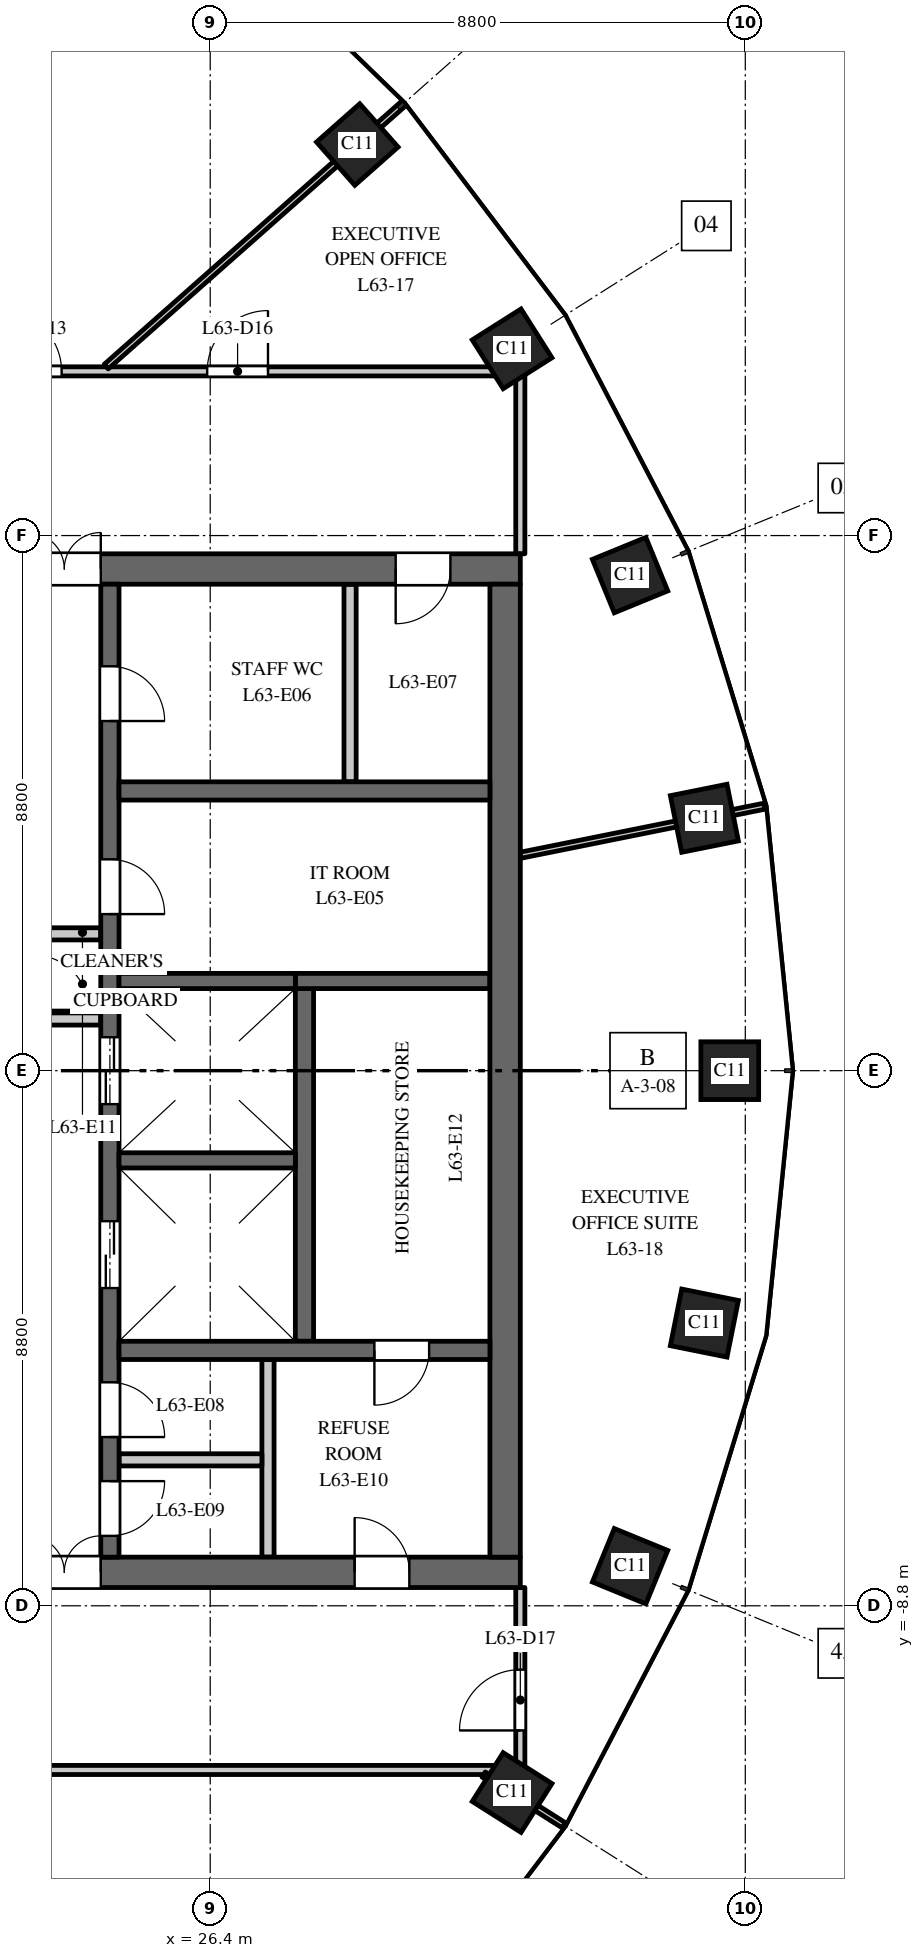
"""IFC4 building model, lengths in metres.
Left out: names, types, materials, properties, quantities, classifications, styles, units other than length and angle.
Written with IfcOpenShell. Run it as: python <this file> out.ifc"""

import sys

from ifc_helpers import new_model, si_unit, direction, frame, frame_2d, origin, origin_2d, place, context, subcontext, project, spatial, rectangle, extrude, element, fill, save


model = new_model("IFC4")
c1 = context("Model", 3, precision=1e-05, world=origin(), true_north=direction((0.0, 1.0)))
c2 = subcontext(c1, "Body", "Model", "MODEL_VIEW")
j1 = project(units=[si_unit("LENGTHUNIT", "METRE"), si_unit("PLANEANGLEUNIT", "RADIAN")], contexts=[c1])
p1 = place(None, origin())
s1 = spatial("IfcSite", under=j1, at=p1, CompositionType="ELEMENT")
p2 = place(p1, origin())
s2 = spatial("IfcBuilding", under=s1, at=p2, CompositionType="ELEMENT")
p3 = place(p2, frame((0.0, 0.0, 295.0)))
s3 = spatial("IfcBuildingStorey", under=s2, at=p3, CompositionType="ELEMENT", Elevation=295.0)
for number, where, z_axis, x_axis in (
    (1, (34.945, 0.0, 0.0), (0.0, 0.0, 1.0), (0.0, 1.0, 0.0)),
    (2, (34.527, 4.151, 0.0), (0.0, 0.0, 1.0), (-0.197, 0.98, 0.0)),
    (3, (33.305, 8.149, 0.0), (0.0, 0.0, 1.0), (-0.379, 0.925, 0.0)),
    (4, (31.365, 11.871, 0.0), (0.0, 0.0, 1.0), (-0.535, 0.845, 0.0)),
    (5, (28.819, 15.23, 0.0), (0.0, 0.0, 1.0), (-0.663, 0.749, 0.0)),
    (6, (31.365, -11.871, 0.0), (0.0, 0.0, 1.0), (0.535, 0.845, 0.0)),
    (7, (33.305, -8.149, 0.0), (0.0, 0.0, 1.0), (0.379, 0.925, 0.0)),
    (8, (34.527, -4.151, 0.0), (0.0, 0.0, 1.0), (0.197, 0.98, 0.0)),
):
    element("IfcColumn", number, at=place(p3, frame(where, z_axis=z_axis, x_axis=x_axis)), inside=s3, PredefinedType="COLUMN", context=c2, shape_type="SweptSolid", body=[
        extrude(rectangle(XDim=0.95, YDim=0.95, at=origin_2d()), origin(), (0.0, 0.0, 1.0), 4.0),
    ])
p4 = place(p3, frame((16.5, 8.25, 0.0), z_axis=(0.0, 0.0, 1.0), x_axis=(1.0, 0.0, 0.0)))
e9 = element("IfcWall", 9, at=p4, inside=s3, PredefinedType="SHEAR", context=c2, shape_type="SweptSolid", body=[
    extrude(rectangle(XDim=15.0, YDim=0.5, at=frame_2d((7.5, 0.0))), origin(), (0.0, 0.0, 1.0), 3.7),
])
p5 = place(p4, frame((6.9, 0.0, 0.0)))
e10 = element("IfcOpeningElement", 10, at=p5, cuts=e9, PredefinedType="OPENING", context=c2, shape_type="SweptSolid", body=[
    extrude(rectangle(XDim=1.2, YDim=2.1, at=frame_2d((0.6, 1.05))), frame((0.0, 0.26, 0.0), z_axis=(0.0, -1.0, 0.0), x_axis=(1.0, 0.0, 0.0)), (0.0, 0.0, 1.0), 0.52),
])
p6 = place(p4, frame((12.95, 0.0, 0.0)))
e11 = element("IfcOpeningElement", 11, at=p6, cuts=e9, PredefinedType="OPENING", context=c2, shape_type="SweptSolid", body=[
    extrude(rectangle(XDim=0.9, YDim=2.1, at=frame_2d((0.45, 1.05))), frame((0.0, 0.26, 0.0), z_axis=(0.0, -1.0, 0.0), x_axis=(1.0, 0.0, 0.0)), (0.0, 0.0, 1.0), 0.52),
])
p7 = place(p3, frame((16.5, -8.25, 0.0), z_axis=(0.0, 0.0, 1.0), x_axis=(1.0, 0.0, 0.0)))
e12 = element("IfcWall", 12, at=p7, inside=s3, PredefinedType="SHEAR", context=c2, shape_type="SweptSolid", body=[
    extrude(rectangle(XDim=15.0, YDim=0.5, at=frame_2d((7.5, 0.0))), origin(), (0.0, 0.0, 1.0), 3.7),
])
p8 = place(p7, frame((6.9, 0.0, 0.0)))
e13 = element("IfcOpeningElement", 13, at=p8, cuts=e12, PredefinedType="OPENING", context=c2, shape_type="SweptSolid", body=[
    extrude(rectangle(XDim=1.2, YDim=2.1, at=frame_2d((0.6, 1.05))), frame((0.0, 0.26, 0.0), z_axis=(0.0, -1.0, 0.0), x_axis=(1.0, 0.0, 0.0)), (0.0, 0.0, 1.0), 0.52),
])
p9 = place(p7, frame((12.275, 0.0, 0.0)))
e14 = element("IfcOpeningElement", 14, at=p9, cuts=e12, PredefinedType="OPENING", context=c2, shape_type="SweptSolid", body=[
    extrude(rectangle(XDim=0.9, YDim=2.1, at=frame_2d((0.45, 1.05))), frame((0.0, 0.26, 0.0), z_axis=(0.0, -1.0, 0.0), x_axis=(1.0, 0.0, 0.0)), (0.0, 0.0, 1.0), 0.52),
])
p10 = place(p3, frame((27.95, -4.45, 0.0), z_axis=(0.0, 0.0, 1.0), x_axis=(0.0, 1.0, 0.0)))
e15 = element("IfcWall", 15, at=p10, inside=s3, PredefinedType="SHEAR", context=c2, shape_type="SweptSolid", body=[
    extrude(rectangle(XDim=5.8, YDim=0.3, at=frame_2d((2.9, 0.0))), origin(), (0.0, 0.0, 1.0), 3.7),
])
p11 = place(p3, frame((27.8, 1.475, 0.0), z_axis=(0.0, 0.0, 1.0), x_axis=(1.0, 0.0, 0.0)))
e16 = element("IfcWall", 16, at=p11, inside=s3, PredefinedType="SHEAR", context=c2, shape_type="SweptSolid", body=[
    extrude(rectangle(XDim=3.2, YDim=0.25, at=frame_2d((1.6, 0.0))), origin(), (0.0, 0.0, 1.0), 3.7),
])
p12 = place(p3, frame((24.75, -8.0, 0.0), z_axis=(0.0, 0.0, 1.0), x_axis=(0.0, 1.0, 0.0)))
e17 = element("IfcWall", 17, at=p12, inside=s3, PredefinedType="SHEAR", context=c2, shape_type="SweptSolid", body=[
    extrude(rectangle(XDim=16.0, YDim=0.3, at=frame_2d((8.0, 0.0))), origin(), (0.0, 0.0, 1.0), 3.7),
])
p13 = place(p12, frame((4.425, 0.0, 0.0)))
e18 = element("IfcOpeningElement", 18, at=p13, cuts=e17, PredefinedType="OPENING", context=c2, shape_type="SweptSolid", body=[
    extrude(rectangle(XDim=1.1, YDim=2.1, at=frame_2d((0.55, 1.05))), frame((0.0, 0.16, 0.0), z_axis=(0.0, -1.0, 0.0), x_axis=(1.0, 0.0, 0.0)), (0.0, 0.0, 1.0), 0.32),
])
p14 = place(p12, frame((7.45, 0.0, 0.0)))
e19 = element("IfcOpeningElement", 19, at=p14, cuts=e17, PredefinedType="OPENING", context=c2, shape_type="SweptSolid", body=[
    extrude(rectangle(XDim=1.1, YDim=2.1, at=frame_2d((0.55, 1.05))), frame((0.0, 0.16, 0.0), z_axis=(0.0, -1.0, 0.0), x_axis=(1.0, 0.0, 0.0)), (0.0, 0.0, 1.0), 0.32),
])
p15 = place(p12, frame((10.575, 0.0, 0.0)))
e20 = element("IfcOpeningElement", 20, at=p15, cuts=e17, PredefinedType="OPENING", context=c2, shape_type="SweptSolid", body=[
    extrude(rectangle(XDim=0.9, YDim=2.1, at=frame_2d((0.45, 1.05))), frame((0.0, 0.16, 0.0), z_axis=(0.0, -1.0, 0.0), x_axis=(1.0, 0.0, 0.0)), (0.0, 0.0, 1.0), 0.32),
])
p16 = place(p12, frame((13.75, 0.0, 0.0)))
e21 = element("IfcOpeningElement", 21, at=p16, cuts=e17, PredefinedType="OPENING", context=c2, shape_type="SweptSolid", body=[
    extrude(rectangle(XDim=0.9, YDim=2.1, at=frame_2d((0.45, 1.05))), frame((0.0, 0.16, 0.0), z_axis=(0.0, -1.0, 0.0), x_axis=(1.0, 0.0, 0.0)), (0.0, 0.0, 1.0), 0.32),
])
p17 = place(p12, frame((1.975, 0.0, 0.0)))
e22 = element("IfcOpeningElement", 22, at=p17, cuts=e17, PredefinedType="OPENING", context=c2, shape_type="SweptSolid", body=[
    extrude(rectangle(XDim=0.9, YDim=2.1, at=frame_2d((0.45, 1.05))), frame((0.0, 0.16, 0.0), z_axis=(0.0, -1.0, 0.0), x_axis=(1.0, 0.0, 0.0)), (0.0, 0.0, 1.0), 0.32),
])
p18 = place(p12, frame((0.35, 0.0, 0.0)))
e23 = element("IfcOpeningElement", 23, at=p18, cuts=e17, PredefinedType="OPENING", context=c2, shape_type="SweptSolid", body=[
    extrude(rectangle(XDim=0.9, YDim=2.1, at=frame_2d((0.45, 1.05))), frame((0.0, 0.16, 0.0), z_axis=(0.0, -1.0, 0.0), x_axis=(1.0, 0.0, 0.0)), (0.0, 0.0, 1.0), 0.32),
])
for number, where, z_axis, x_axis in (
    (24, (23.4, 0.85, 0.0), (0.0, 0.0, 1.0), (1.0, 0.0, 0.0)),
    (25, (23.4, 2.25, 0.0), (0.0, 0.0, 1.0), (1.0, 0.0, 0.0)),
):
    element("IfcWall", number, at=place(p3, frame(where, z_axis=z_axis, x_axis=x_axis)), inside=s3, PredefinedType="PARTITIONING", context=c2, shape_type="SweptSolid", body=[
        extrude(rectangle(XDim=1.2, YDim=0.2, at=frame_2d((0.6, 0.0))), origin(), (0.0, 0.0, 1.0), 3.7),
    ])
p19 = place(p3, frame((31.25, -8.0, 0.0), z_axis=(0.0, 0.0, 1.0), x_axis=(0.0, 1.0, 0.0)))
e26 = element("IfcWall", 26, at=p19, inside=s3, PredefinedType="SHEAR", context=c2, shape_type="SweptSolid", body=[
    extrude(rectangle(XDim=16.0, YDim=0.5, at=frame_2d((8.0, 0.0))), origin(), (0.0, 0.0, 1.0), 3.7),
])
p20 = place(p3, frame((24.9, 4.6, 0.0), z_axis=(0.0, 0.0, 1.0), x_axis=(1.0, 0.0, 0.0)))
e27 = element("IfcWall", 27, at=p20, inside=s3, PredefinedType="SHEAR", context=c2, shape_type="SweptSolid", body=[
    extrude(rectangle(XDim=6.1, YDim=0.3, at=frame_2d((3.05, 0.0))), origin(), (0.0, 0.0, 1.0), 3.7),
])
for number, where, z_axis, x_axis in (
    (28, (28.7, 4.75, 0.0), (0.0, 0.0, 1.0), (0.0, 1.0, 0.0)),
    (29, (27.35, -8.0, 0.0), (0.0, 0.0, 1.0), (0.0, 1.0, 0.0)),
):
    element("IfcWall", number, at=place(p3, frame(where, z_axis=z_axis, x_axis=x_axis)), inside=s3, PredefinedType="PARTITIONING", context=c2, shape_type="SweptSolid", body=[
        extrude(rectangle(XDim=3.25, YDim=0.2, at=frame_2d((1.625, 0.0))), origin(), (0.0, 0.0, 1.0), 3.7),
    ])
p21 = place(p3, frame((24.9, -6.4, 0.0), z_axis=(0.0, 0.0, 1.0), x_axis=(1.0, 0.0, 0.0)))
e30 = element("IfcWall", 30, at=p21, inside=s3, PredefinedType="PARTITIONING", context=c2, shape_type="SweptSolid", body=[
    extrude(rectangle(XDim=2.35, YDim=0.2, at=frame_2d((1.175, 0.0))), origin(), (0.0, 0.0, 1.0), 3.7),
])
p22 = place(p3, frame((24.9, -4.6, 0.0), z_axis=(0.0, 0.0, 1.0), x_axis=(1.0, 0.0, 0.0)))
e31 = element("IfcWall", 31, at=p22, inside=s3, PredefinedType="SHEAR", context=c2, shape_type="SweptSolid", body=[
    extrude(rectangle(XDim=6.1, YDim=0.3, at=frame_2d((3.05, 0.0))), origin(), (0.0, 0.0, 1.0), 3.7),
])
p23 = place(p22, frame((4.2, 0.0, 0.0)))
e32 = element("IfcOpeningElement", 32, at=p23, cuts=e31, PredefinedType="OPENING", context=c2, shape_type="SweptSolid", body=[
    extrude(rectangle(XDim=0.9, YDim=2.1, at=frame_2d((0.45, 1.05))), frame((0.0, 0.16, 0.0), z_axis=(0.0, -1.0, 0.0), x_axis=(1.0, 0.0, 0.0)), (0.0, 0.0, 1.0), 0.32),
])
for number, where, z_axis, x_axis in (
    (33, (24.9, -1.475, 0.0), (0.0, 0.0, 1.0), (1.0, 0.0, 0.0)),
    (34, (24.9, 1.475, 0.0), (0.0, 0.0, 1.0), (1.0, 0.0, 0.0)),
):
    element("IfcWall", number, at=place(p3, frame(where, z_axis=z_axis, x_axis=x_axis)), inside=s3, PredefinedType="SHEAR", context=c2, shape_type="SweptSolid", body=[
        extrude(rectangle(XDim=2.9, YDim=0.25, at=frame_2d((1.45, 0.0))), origin(), (0.0, 0.0, 1.0), 3.7),
    ])
p24 = place(p3, frame((4.262, 11.5, 0.0), z_axis=(0.0, 0.0, 1.0), x_axis=(1.0, 0.0, 0.0)))
e35 = element("IfcWall", 35, at=p24, inside=s3, PredefinedType="PARTITIONING", context=c2, shape_type="SweptSolid", body=[
    extrude(rectangle(XDim=27.238, YDim=0.15, at=frame_2d((13.619, 0.0))), origin(), (0.0, 0.0, 1.0), 2.75),
])
p25 = place(p24, frame((18.694, 0.0, 0.0)))
e36 = element("IfcOpeningElement", 36, at=p25, cuts=e35, PredefinedType="OPENING", context=c2, shape_type="SweptSolid", body=[
    extrude(rectangle(XDim=1.0, YDim=2.1, at=frame_2d((0.5, 1.05))), frame((0.0, 0.085, 0.0), z_axis=(0.0, -1.0, 0.0), x_axis=(1.0, 0.0, 0.0)), (0.0, 0.0, 1.0), 0.17),
])
p26 = place(p24, frame((22.088, 0.0, 0.0)))
e37 = element("IfcOpeningElement", 37, at=p26, cuts=e35, PredefinedType="OPENING", context=c2, shape_type="SweptSolid", body=[
    extrude(rectangle(XDim=1.0, YDim=2.1, at=frame_2d((0.5, 1.05))), frame((0.0, 0.085, 0.0), z_axis=(0.0, -1.0, 0.0), x_axis=(1.0, 0.0, 0.0)), (0.0, 0.0, 1.0), 0.17),
])
p27 = place(p3, frame((7.129, -11.5, 0.0), z_axis=(0.0, 0.0, 1.0), x_axis=(1.0, 0.0, 0.0)))
e38 = element("IfcWall", 38, at=p27, inside=s3, PredefinedType="PARTITIONING", context=c2, shape_type="SweptSolid", body=[
    extrude(rectangle(XDim=24.371, YDim=0.15, at=frame_2d((12.186, 0.0))), origin(), (0.0, 0.0, 1.0), 2.75),
])
p28 = place(p27, frame((7.633, 0.0, 0.0)))
e39 = element("IfcOpeningElement", 39, at=p28, cuts=e38, PredefinedType="OPENING", context=c2, shape_type="SweptSolid", body=[
    extrude(rectangle(XDim=1.0, YDim=2.1, at=frame_2d((0.5, 1.05))), frame((0.0, 0.085, 0.0), z_axis=(0.0, -1.0, 0.0), x_axis=(1.0, 0.0, 0.0)), (0.0, 0.0, 1.0), 0.17),
])
p29 = place(p27, frame((10.195, 0.0, 0.0)))
e40 = element("IfcOpeningElement", 40, at=p29, cuts=e38, PredefinedType="OPENING", context=c2, shape_type="SweptSolid", body=[
    extrude(rectangle(XDim=1.0, YDim=2.1, at=frame_2d((0.5, 1.05))), frame((0.0, 0.085, 0.0), z_axis=(0.0, -1.0, 0.0), x_axis=(1.0, 0.0, 0.0)), (0.0, 0.0, 1.0), 0.17),
])
p30 = place(p3, frame((24.689, 11.578, 0.0), z_axis=(0.0, 0.0, 1.0), x_axis=(0.748988695283, 0.662582775461, 0.0)))
e41 = element("IfcWall", 41, at=p30, inside=s3, PredefinedType="PARTITIONING", context=c2, shape_type="SweptSolid", body=[
    extrude(rectangle(XDim=6.516, YDim=0.1, at=frame_2d((3.258, 0.0))), origin(), (0.0, 0.0, 1.0), 2.75),
])
p31 = place(p3, frame((30.897, -11.575, 0.0), z_axis=(0.0, 0.0, 1.0), x_axis=(0.844757626245, -0.535149094086, 0.0)))
e42 = element("IfcWall", 42, at=p31, inside=s3, PredefinedType="PARTITIONING", context=c2, shape_type="SweptSolid", body=[
    extrude(rectangle(XDim=1.557, YDim=0.1, at=frame_2d((0.778, 0.0))), origin(), (0.0, 0.0, 1.0), 3.0),
])
p32 = place(p3, frame((31.5, -11.5, 0.0), z_axis=(0.0, 0.0, 1.0), x_axis=(0.0, 1.0, 0.0)))
e43 = element("IfcWall", 43, at=p32, inside=s3, PredefinedType="PARTITIONING", context=c2, shape_type="SweptSolid", body=[
    extrude(rectangle(XDim=3.0, YDim=0.15, at=frame_2d((1.5, 0.0))), origin(), (0.0, 0.0, 1.0), 3.0),
])
p33 = place(p32, frame((0.65, 0.0, 0.0)))
e44 = element("IfcOpeningElement", 44, at=p33, cuts=e43, PredefinedType="OPENING", context=c2, shape_type="SweptSolid", body=[
    extrude(rectangle(XDim=1.0, YDim=2.1, at=frame_2d((0.5, 1.05))), frame((0.0, 0.085, 0.0), z_axis=(0.0, -1.0, 0.0), x_axis=(1.0, 0.0, 0.0)), (0.0, 0.0, 1.0), 0.17),
])
p34 = place(p3, frame((31.5, 3.542, 0.0), z_axis=(0.0, 0.0, 1.0), x_axis=(0.980357474535, 0.197228857227, 0.0)))
e45 = element("IfcWall", 45, at=p34, inside=s3, PredefinedType="PARTITIONING", context=c2, shape_type="SweptSolid", body=[
    extrude(rectangle(XDim=4.092, YDim=0.1, at=frame_2d((2.046, 0.0))), origin(), (0.0, 0.0, 1.0), 3.0),
])
p35 = place(p3, frame((31.5, 8.5, 0.0), z_axis=(0.0, 0.0, 1.0), x_axis=(0.0, 1.0, 0.0)))
e46 = element("IfcWall", 46, at=p35, inside=s3, PredefinedType="PARTITIONING", context=c2, shape_type="SweptSolid", body=[
    extrude(rectangle(XDim=3.0, YDim=0.15, at=frame_2d((1.5, 0.0))), origin(), (0.0, 0.0, 1.0), 3.0),
])
p36 = place(p13, origin())
e47 = element("IfcDoor", 47, at=p36, inside=s3, OperationType="DOUBLE_DOOR_SLIDING", PredefinedType="DOOR", context=c2, shape_type="SweptSolid", body=[
    extrude(rectangle(XDim=1.1, YDim=2.1, at=frame_2d((0.55, 1.05))), frame((0.0, 0.025, 0.0), z_axis=(0.0, -1.0, 0.0), x_axis=(1.0, 0.0, 0.0)), (0.0, 0.0, 1.0), 0.05),
])
fill(e18, e47)
p37 = place(p14, origin())
e48 = element("IfcDoor", 48, at=p37, inside=s3, OperationType="DOUBLE_DOOR_SLIDING", PredefinedType="DOOR", context=c2, shape_type="SweptSolid", body=[
    extrude(rectangle(XDim=1.1, YDim=2.1, at=frame_2d((0.55, 1.05))), frame((0.0, 0.025, 0.0), z_axis=(0.0, -1.0, 0.0), x_axis=(1.0, 0.0, 0.0)), (0.0, 0.0, 1.0), 0.05),
])
fill(e19, e48)
p38 = place(p5, origin())
e49 = element("IfcDoor", 49, at=p38, inside=s3, OperationType="DOUBLE_DOOR_DOUBLE_SWING", PredefinedType="DOOR", context=c2, shape_type="SweptSolid", body=[
    extrude(rectangle(XDim=1.2, YDim=2.1, at=frame_2d((0.6, 1.05))), frame((0.0, 0.025, 0.0), z_axis=(0.0, -1.0, 0.0), x_axis=(1.0, 0.0, 0.0)), (0.0, 0.0, 1.0), 0.05),
])
fill(e10, e49)
p39 = place(p8, origin())
e50 = element("IfcDoor", 50, at=p39, inside=s3, OperationType="DOUBLE_DOOR_DOUBLE_SWING", PredefinedType="DOOR", context=c2, shape_type="SweptSolid", body=[
    extrude(rectangle(XDim=1.2, YDim=2.1, at=frame_2d((0.6, 1.05))), frame((0.0, 0.025, 0.0), z_axis=(0.0, -1.0, 0.0), x_axis=(1.0, 0.0, 0.0)), (0.0, 0.0, 1.0), 0.05),
])
fill(e13, e50)
p40 = place(p15, origin())
e51 = element("IfcDoor", 51, at=p40, inside=s3, OperationType="SINGLE_SWING_LEFT", PredefinedType="DOOR", context=c2, shape_type="SweptSolid", body=[
    extrude(rectangle(XDim=0.9, YDim=2.1, at=frame_2d((0.45, 1.05))), frame((0.0, 0.025, 0.0), z_axis=(0.0, -1.0, 0.0), x_axis=(1.0, 0.0, 0.0)), (0.0, 0.0, 1.0), 0.05),
])
fill(e20, e51)
p41 = place(p16, origin())
e52 = element("IfcDoor", 52, at=p41, inside=s3, OperationType="SINGLE_SWING_LEFT", PredefinedType="DOOR", context=c2, shape_type="SweptSolid", body=[
    extrude(rectangle(XDim=0.9, YDim=2.1, at=frame_2d((0.45, 1.05))), frame((0.0, 0.025, 0.0), z_axis=(0.0, -1.0, 0.0), x_axis=(1.0, 0.0, 0.0)), (0.0, 0.0, 1.0), 0.05),
])
fill(e21, e52)
p42 = place(p6, origin())
e53 = element("IfcDoor", 53, at=p42, inside=s3, OperationType="SINGLE_SWING_LEFT", PredefinedType="DOOR", context=c2, shape_type="SweptSolid", body=[
    extrude(rectangle(XDim=0.9, YDim=2.1, at=frame_2d((0.45, 1.05))), frame((0.0, 0.025, 0.0), z_axis=(0.0, -1.0, 0.0), x_axis=(1.0, 0.0, 0.0)), (0.0, 0.0, 1.0), 0.05),
])
fill(e11, e53)
p43 = place(p17, origin())
e54 = element("IfcDoor", 54, at=p43, inside=s3, OperationType="SINGLE_SWING_LEFT", PredefinedType="DOOR", context=c2, shape_type="SweptSolid", body=[
    extrude(rectangle(XDim=0.9, YDim=2.1, at=frame_2d((0.45, 1.05))), frame((0.0, 0.025, 0.0), z_axis=(0.0, -1.0, 0.0), x_axis=(1.0, 0.0, 0.0)), (0.0, 0.0, 1.0), 0.05),
])
fill(e22, e54)
p44 = place(p18, origin())
e55 = element("IfcDoor", 55, at=p44, inside=s3, OperationType="SINGLE_SWING_RIGHT", PredefinedType="DOOR", context=c2, shape_type="SweptSolid", body=[
    extrude(rectangle(XDim=0.9, YDim=2.1, at=frame_2d((0.45, 1.05))), frame((0.0, 0.025, 0.0), z_axis=(0.0, -1.0, 0.0), x_axis=(1.0, 0.0, 0.0)), (0.0, 0.0, 1.0), 0.05),
])
fill(e23, e55)
p45 = place(p9, origin())
e56 = element("IfcDoor", 56, at=p45, inside=s3, OperationType="SINGLE_SWING_RIGHT", PredefinedType="DOOR", context=c2, shape_type="SweptSolid", body=[
    extrude(rectangle(XDim=0.9, YDim=2.1, at=frame_2d((0.45, 1.05))), frame((0.0, 0.025, 0.0), z_axis=(0.0, -1.0, 0.0), x_axis=(1.0, 0.0, 0.0)), (0.0, 0.0, 1.0), 0.05),
])
fill(e14, e56)
p46 = place(p23, origin())
e57 = element("IfcDoor", 57, at=p46, inside=s3, OperationType="SINGLE_SWING_LEFT", PredefinedType="DOOR", context=c2, shape_type="SweptSolid", body=[
    extrude(rectangle(XDim=0.9, YDim=2.1, at=frame_2d((0.45, 1.05))), frame((0.0, 0.025, 0.0), z_axis=(0.0, -1.0, 0.0), x_axis=(1.0, 0.0, 0.0)), (0.0, 0.0, 1.0), 0.05),
])
fill(e32, e57)
p47 = place(p25, origin())
e58 = element("IfcDoor", 58, at=p47, inside=s3, OperationType="SINGLE_SWING_LEFT", PredefinedType="DOOR", context=c2, shape_type="SweptSolid", body=[
    extrude(rectangle(XDim=1.0, YDim=2.1, at=frame_2d((0.5, 1.05))), frame((0.0, 0.025, 0.0), z_axis=(0.0, -1.0, 0.0), x_axis=(1.0, 0.0, 0.0)), (0.0, 0.0, 1.0), 0.05),
])
fill(e36, e58)
p48 = place(p26, origin())
e59 = element("IfcDoor", 59, at=p48, inside=s3, OperationType="SINGLE_SWING_RIGHT", PredefinedType="DOOR", context=c2, shape_type="SweptSolid", body=[
    extrude(rectangle(XDim=1.0, YDim=2.1, at=frame_2d((0.5, 1.05))), frame((0.0, 0.025, 0.0), z_axis=(0.0, -1.0, 0.0), x_axis=(1.0, 0.0, 0.0)), (0.0, 0.0, 1.0), 0.05),
])
fill(e37, e59)
p49 = place(p33, origin())
e60 = element("IfcDoor", 60, at=p49, inside=s3, OperationType="SINGLE_SWING_LEFT", PredefinedType="DOOR", context=c2, shape_type="SweptSolid", body=[
    extrude(rectangle(XDim=1.0, YDim=2.1, at=frame_2d((0.5, 1.05))), frame((0.0, 0.025, 0.0), z_axis=(0.0, -1.0, 0.0), x_axis=(1.0, 0.0, 0.0)), (0.0, 0.0, 1.0), 0.05),
])
fill(e44, e60)
save(model, sys.argv[1])
